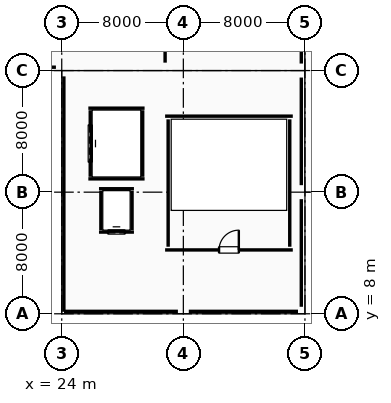
"""IFC4 building model, lengths in metres.
Left out: names, types, materials, properties, quantities, classifications, styles, units other than length and angle.
Written with IfcOpenShell. Run it as: python <this file> out.ifc"""

import sys

from ifc_helpers import new_model, si_unit, direction, frame, frame_2d, origin, origin_2d, place, context, subcontext, project, spatial, rectangle, circle, extrude, element, fill, save


model = new_model("IFC4")
c1 = context("Model", 3, precision=1e-05, world=origin(), true_north=direction((0.0, 1.0)))
c2 = subcontext(c1, "Body", "Model", "MODEL_VIEW")
j1 = project(units=[si_unit("LENGTHUNIT", "METRE"), si_unit("PLANEANGLEUNIT", "RADIAN")], contexts=[c1])
p1 = place(None, origin())
s1 = spatial("IfcSite", under=j1, at=p1, CompositionType="ELEMENT")
p2 = place(p1, origin())
s2 = spatial("IfcBuilding", under=s1, at=p2, CompositionType="ELEMENT")
p3 = place(p2, frame((0.0, 0.0, 19.8)))
s3 = spatial("IfcBuildingStorey", under=s2, at=p3, CompositionType="ELEMENT", Elevation=19.8)
p4 = place(p3, frame((24.0, 24.0, 0.0), z_axis=(0.0, 0.0, 1.0), x_axis=(1.0, 0.0, 0.0)))
e1 = element("IfcColumn", 1, at=p4, inside=s3, PredefinedType="COLUMN", context=c2, shape_type="SweptSolid", body=[
    extrude(rectangle(XDim=0.75, YDim=0.75, at=origin_2d()), origin(), (0.0, 0.0, 1.0), 4.5),
])
p5 = place(p3, frame((32.0, 8.0, 0.0), z_axis=(0.0, 0.0, 1.0), x_axis=(1.0, 0.0, 0.0)))
e2 = element("IfcColumn", 2, at=p5, inside=s3, PredefinedType="COLUMN", context=c2, shape_type="SweptSolid", body=[
    extrude(circle(Radius=0.35, at=origin_2d()), origin(), (0.0, 0.0, 1.0), 4.46),
])
p6 = place(p3, frame((32.0, 24.0, 0.0), z_axis=(0.0, 0.0, 1.0), x_axis=(1.0, 0.0, 0.0)))
e3 = element("IfcColumn", 3, at=p6, inside=s3, PredefinedType="COLUMN", context=c2, shape_type="SweptSolid", body=[
    extrude(rectangle(XDim=0.75, YDim=0.75, at=origin_2d()), origin(), (0.0, 0.0, 1.0), 4.5),
])
for number, where, z_axis, x_axis in (
    (4, (40.0, 8.0, 0.0), (0.0, 0.0, 1.0), (1.0, 0.0, 0.0)),
    (5, (40.0, 16.0, 0.0), (0.0, 0.0, 1.0), (1.0, 0.0, 0.0)),
):
    element("IfcColumn", number, at=place(p3, frame(where, z_axis=z_axis, x_axis=x_axis)), inside=s3, PredefinedType="COLUMN", context=c2, shape_type="SweptSolid", body=[
        extrude(rectangle(XDim=0.9, YDim=0.9, at=origin_2d()), origin(), (0.0, 0.0, 1.0), 4.46),
    ])
p7 = place(p3, frame((40.0, 24.0, 0.0), z_axis=(0.0, 0.0, 1.0), x_axis=(1.0, 0.0, 0.0)))
e6 = element("IfcColumn", 6, at=p7, inside=s3, PredefinedType="COLUMN", context=c2, shape_type="SweptSolid", body=[
    extrude(rectangle(XDim=0.9, YDim=0.9, at=origin_2d()), origin(), (0.0, 0.0, 1.0), 4.5),
])
for number, where, z_axis, x_axis in (
    (7, (39.76, 31.54, 0.0), (0.0, 0.0, 1.0), (0.0, -1.0, 0.0)),
    (8, (39.76, 23.54, 0.0), (0.0, 0.0, 1.0), (0.0, -1.0, 0.0)),
    (9, (39.76, 15.54, 0.0), (0.0, 0.0, 1.0), (0.0, -1.0, 0.0)),
):
    element("IfcWall", number, at=place(p3, frame(where, z_axis=z_axis, x_axis=x_axis)), inside=s3, PredefinedType="PARAPET", context=c2, shape_type="SweptSolid", body=[
        extrude(rectangle(XDim=7.08, YDim=0.18, at=frame_2d((3.54, 0.0))), origin(), (0.0, 0.0, 1.0), 0.88),
    ])
p8 = place(p3, frame((39.542, 8.16, 0.0), z_axis=(0.0, 0.0, 1.0), x_axis=(-1.0, 0.0, 0.0)))
e10 = element("IfcWall", 10, at=p8, inside=s3, PredefinedType="STANDARD", context=c2, shape_type="SweptSolid", body=[
    extrude(rectangle(XDim=7.184, YDim=0.28, at=frame_2d((3.592, 0.0))), origin(), (0.0, 0.0, 1.0), 3.485),
])
p9 = place(p8, frame((2.392, 0.0, 0.95)))
e11 = element("IfcOpeningElement", 11, at=p9, cuts=e10, PredefinedType="OPENING", context=c2, shape_type="SweptSolid", body=[
    extrude(rectangle(XDim=2.4, YDim=1.2, at=frame_2d((1.2, 0.6))), frame((0.0, 0.15, 0.0), z_axis=(0.0, -1.0, 0.0), x_axis=(1.0, 0.0, 0.0)), (0.0, 0.0, 1.0), 0.3),
])
p10 = place(p3, frame((31.642, 8.16, 0.0), z_axis=(0.0, 0.0, 1.0), x_axis=(-1.0, 0.0, 0.0)))
e12 = element("IfcWall", 12, at=p10, inside=s3, PredefinedType="STANDARD", context=c2, shape_type="SweptSolid", body=[
    extrude(rectangle(XDim=7.492, YDim=0.28, at=frame_2d((3.746, 0.0))), origin(), (0.0, 0.0, 1.0), 4.28),
])
p11 = place(p10, frame((2.546, 0.0, 0.95)))
e13 = element("IfcOpeningElement", 13, at=p11, cuts=e12, PredefinedType="OPENING", context=c2, shape_type="SweptSolid", body=[
    extrude(rectangle(XDim=2.4, YDim=1.5, at=frame_2d((1.2, 0.75))), frame((0.0, 0.15, 0.0), z_axis=(0.0, -1.0, 0.0), x_axis=(1.0, 0.0, 0.0)), (0.0, 0.0, 1.0), 0.3),
])
p12 = place(p3, frame((24.14, 8.13, 0.0), z_axis=(0.0, 0.0, 1.0), x_axis=(0.0, 1.0, 0.0)))
e14 = element("IfcWall", 14, at=p12, inside=s3, PredefinedType="ELEMENTEDWALL", context=c2, shape_type="SweptSolid", body=[
    extrude(rectangle(XDim=15.487, YDim=0.24, at=frame_2d((7.744, 0.0))), origin(), (0.0, 0.0, 1.0), 4.28),
])
p13 = place(p3, frame((23.617, 24.22, 0.0), z_axis=(0.0, 0.0, 1.0), x_axis=(-1.0, 0.0, 0.0)))
e15 = element("IfcWall", 15, at=p13, inside=s3, PredefinedType="STANDARD", context=c2, shape_type="SweptSolid", body=[
    extrude(rectangle(XDim=7.159, YDim=0.4, at=frame_2d((3.58, 0.0))), origin(), (0.0, 0.0, 1.0), 3.735),
])
p14 = place(p13, frame((2.38, 0.0, 0.95)))
e16 = element("IfcOpeningElement", 16, at=p14, cuts=e15, PredefinedType="OPENING", context=c2, shape_type="SweptSolid", body=[
    extrude(rectangle(XDim=2.4, YDim=1.8, at=frame_2d((1.2, 0.9))), frame((0.0, 0.21, 0.0), z_axis=(0.0, -1.0, 0.0), x_axis=(1.0, 0.0, 0.0)), (0.0, 0.0, 1.0), 0.42),
])
p15 = place(p3, frame((30.8, 12.2, 0.0), z_axis=(0.0, 0.0, 1.0), x_axis=(1.0, 0.0, 0.0)))
e17 = element("IfcWall", 17, at=p15, inside=s3, PredefinedType="SHEAR", context=c2, shape_type="SweptSolid", body=[
    extrude(rectangle(XDim=8.4, YDim=0.4, at=frame_2d((4.2, 0.0))), origin(), (0.0, 0.0, 1.0), 4.28),
])
p16 = place(p15, frame((3.55, 0.0, 0.0)))
e18 = element("IfcOpeningElement", 18, at=p16, cuts=e17, PredefinedType="OPENING", context=c2, shape_type="SweptSolid", body=[
    extrude(rectangle(XDim=1.3, YDim=2.15, at=frame_2d((0.65, 1.075))), frame((0.0, 0.21, 0.0), z_axis=(0.0, -1.0, 0.0), x_axis=(1.0, 0.0, 0.0)), (0.0, 0.0, 1.0), 0.42),
])
p17 = place(p3, frame((39.2, 21.0, 0.0), z_axis=(0.0, 0.0, 1.0), x_axis=(-1.0, 0.0, 0.0)))
e19 = element("IfcWall", 19, at=p17, inside=s3, PredefinedType="SHEAR", context=c2, shape_type="SweptSolid", body=[
    extrude(rectangle(XDim=8.4, YDim=0.4, at=frame_2d((4.2, 0.0))), origin(), (0.0, 0.0, 1.0), 4.28),
])
for number, where, z_axis, x_axis in (
    (20, (39.0, 12.41, 0.0), (0.0, 0.0, 1.0), (0.0, 1.0, 0.0)),
    (21, (31.0, 20.79, 0.0), (0.0, 0.0, 1.0), (0.0, -1.0, 0.0)),
):
    element("IfcWall", number, at=place(p3, frame(where, z_axis=z_axis, x_axis=x_axis)), inside=s3, PredefinedType="SHEAR", context=c2, shape_type="SweptSolid", body=[
        extrude(rectangle(XDim=8.38, YDim=0.4, at=frame_2d((4.19, 0.0))), origin(), (0.0, 0.0, 1.0), 4.28),
    ])
p18 = place(p3, frame((26.45, 13.375, 0.0), z_axis=(0.0, 0.0, 1.0), x_axis=(1.0, 0.0, 0.0)))
e22 = element("IfcWall", 22, at=p18, inside=s3, PredefinedType="STANDARD", context=c2, shape_type="SweptSolid", body=[
    extrude(rectangle(XDim=2.3, YDim=0.25, at=frame_2d((1.15, 0.0))), origin(), (0.0, 0.0, 1.0), 4.27),
])
p19 = place(p18, frame((0.6, 0.0, 0.0)))
e23 = element("IfcOpeningElement", 23, at=p19, cuts=e22, PredefinedType="OPENING", context=c2, shape_type="SweptSolid", body=[
    extrude(rectangle(XDim=1.1, YDim=2.15, at=frame_2d((0.55, 1.075))), frame((0.0, 0.135, 0.0), z_axis=(0.0, -1.0, 0.0), x_axis=(1.0, 0.0, 0.0)), (0.0, 0.0, 1.0), 0.27),
])
p20 = place(p3, frame((28.75, 16.225, 0.0), z_axis=(0.0, 0.0, 1.0), x_axis=(-1.0, 0.0, 0.0)))
e24 = element("IfcWall", 24, at=p20, inside=s3, PredefinedType="STANDARD", context=c2, shape_type="SweptSolid", body=[
    extrude(rectangle(XDim=2.3, YDim=0.25, at=frame_2d((1.15, 0.0))), origin(), (0.0, 0.0, 1.0), 4.27),
])
for number, where, z_axis, x_axis in (
    (25, (28.625, 13.51, 0.0), (0.0, 0.0, 1.0), (0.0, 1.0, 0.0)),
    (26, (26.575, 16.09, 0.0), (0.0, 0.0, 1.0), (0.0, -1.0, 0.0)),
):
    element("IfcWall", number, at=place(p3, frame(where, z_axis=z_axis, x_axis=x_axis)), inside=s3, PredefinedType="STANDARD", context=c2, shape_type="SweptSolid", body=[
        extrude(rectangle(XDim=2.58, YDim=0.25, at=frame_2d((1.29, 0.0))), origin(), (0.0, 0.0, 1.0), 4.27),
    ])
for number, where, z_axis, x_axis in (
    (27, (25.75, 16.875, 0.0), (0.0, 0.0, 1.0), (1.0, 0.0, 0.0)),
    (28, (29.45, 21.525, 0.0), (0.0, 0.0, 1.0), (-1.0, 0.0, 0.0)),
):
    element("IfcWall", number, at=place(p3, frame(where, z_axis=z_axis, x_axis=x_axis)), inside=s3, PredefinedType="STANDARD", context=c2, shape_type="SweptSolid", body=[
        extrude(rectangle(XDim=3.7, YDim=0.25, at=frame_2d((1.85, 0.0))), origin(), (0.0, 0.0, 1.0), 4.27),
    ])
p21 = place(p3, frame((29.325, 17.01, 0.0), z_axis=(0.0, 0.0, 1.0), x_axis=(0.0, 1.0, 0.0)))
e29 = element("IfcWall", 29, at=p21, inside=s3, PredefinedType="STANDARD", context=c2, shape_type="SweptSolid", body=[
    extrude(rectangle(XDim=4.38, YDim=0.25, at=frame_2d((2.19, 0.0))), origin(), (0.0, 0.0, 1.0), 4.27),
])
p22 = place(p3, frame((25.875, 21.39, 0.0), z_axis=(0.0, 0.0, 1.0), x_axis=(0.0, -1.0, 0.0)))
e30 = element("IfcWall", 30, at=p22, inside=s3, PredefinedType="STANDARD", context=c2, shape_type="SweptSolid", body=[
    extrude(rectangle(XDim=4.38, YDim=0.25, at=frame_2d((2.19, 0.0))), origin(), (0.0, 0.0, 1.0), 4.27),
])
p23 = place(p22, frame((0.99, 0.0, 0.0)))
e31 = element("IfcOpeningElement", 31, at=p23, cuts=e30, PredefinedType="OPENING", context=c2, shape_type="SweptSolid", body=[
    extrude(rectangle(XDim=2.4, YDim=2.55, at=frame_2d((1.2, 1.275))), frame((0.0, 0.135, 0.0), z_axis=(0.0, -1.0, 0.0), x_axis=(1.0, 0.0, 0.0)), (0.0, 0.0, 1.0), 0.27),
])
p24 = place(p3, frame((30.8, 30.88, 0.0), z_axis=(0.0, 0.0, 1.0), x_axis=(0.0, -1.0, 0.0)))
e32 = element("IfcWall", 32, at=p24, inside=s3, PredefinedType="PARTITIONING", context=c2, shape_type="SweptSolid", body=[
    extrude(rectangle(XDim=6.36, YDim=0.2, at=frame_2d((3.18, 0.0))), origin(), (0.0, 0.0, 1.0), 4.5),
])
p25 = place(p24, frame((2.33, 0.0, 0.0)))
e33 = element("IfcOpeningElement", 33, at=p25, cuts=e32, PredefinedType="OPENING", context=c2, shape_type="SweptSolid", body=[
    extrude(rectangle(XDim=1.7, YDim=2.25, at=frame_2d((0.85, 1.125))), frame((0.0, 0.11, 0.0), z_axis=(0.0, -1.0, 0.0), x_axis=(1.0, 0.0, 0.0)), (0.0, 0.0, 1.0), 0.22),
])
p26 = place(p9, origin())
e34 = element("IfcWindow", 34, at=p26, inside=s3, PartitioningType="SINGLE_PANEL", PredefinedType="SKYLIGHT", context=c2, shape_type="SweptSolid", body=[
    extrude(rectangle(XDim=2.4, YDim=1.2, at=frame_2d((1.2, 0.6))), frame((0.0, 0.03, 0.0), z_axis=(0.0, -1.0, 0.0), x_axis=(1.0, 0.0, 0.0)), (0.0, 0.0, 1.0), 0.06),
])
fill(e11, e34)
p27 = place(p11, origin())
e35 = element("IfcWindow", 35, at=p27, inside=s3, PartitioningType="SINGLE_PANEL", PredefinedType="SKYLIGHT", context=c2, shape_type="SweptSolid", body=[
    extrude(rectangle(XDim=2.4, YDim=1.5, at=frame_2d((1.2, 0.75))), frame((0.0, 0.03, 0.0), z_axis=(0.0, -1.0, 0.0), x_axis=(1.0, 0.0, 0.0)), (0.0, 0.0, 1.0), 0.06),
])
fill(e13, e35)
p28 = place(p16, origin())
e36 = element("IfcDoor", 36, at=p28, inside=s3, OperationType="SINGLE_SWING_RIGHT", PredefinedType="DOOR", context=c2, shape_type="SweptSolid", body=[
    extrude(rectangle(XDim=1.3, YDim=2.15, at=frame_2d((0.65, 1.075))), frame((0.0, 0.025, 0.0), z_axis=(0.0, -1.0, 0.0), x_axis=(1.0, 0.0, 0.0)), (0.0, 0.0, 1.0), 0.05),
])
fill(e18, e36)
p29 = place(p19, origin())
e37 = element("IfcDoor", 37, at=p29, inside=s3, OperationType="DOUBLE_DOOR_SLIDING", PredefinedType="DOOR", context=c2, shape_type="SweptSolid", body=[
    extrude(rectangle(XDim=1.1, YDim=2.15, at=frame_2d((0.55, 1.075))), frame((0.0, 0.025, 0.0), z_axis=(0.0, -1.0, 0.0), x_axis=(1.0, 0.0, 0.0)), (0.0, 0.0, 1.0), 0.05),
])
fill(e23, e37)
p30 = place(p23, origin())
e38 = element("IfcDoor", 38, at=p30, inside=s3, OperationType="DOUBLE_DOOR_SLIDING", PredefinedType="DOOR", context=c2, shape_type="SweptSolid", body=[
    extrude(rectangle(XDim=2.4, YDim=2.55, at=frame_2d((1.2, 1.275))), frame((0.0, 0.025, 0.0), z_axis=(0.0, -1.0, 0.0), x_axis=(1.0, 0.0, 0.0)), (0.0, 0.0, 1.0), 0.05),
])
fill(e31, e38)
save(model, sys.argv[1])
